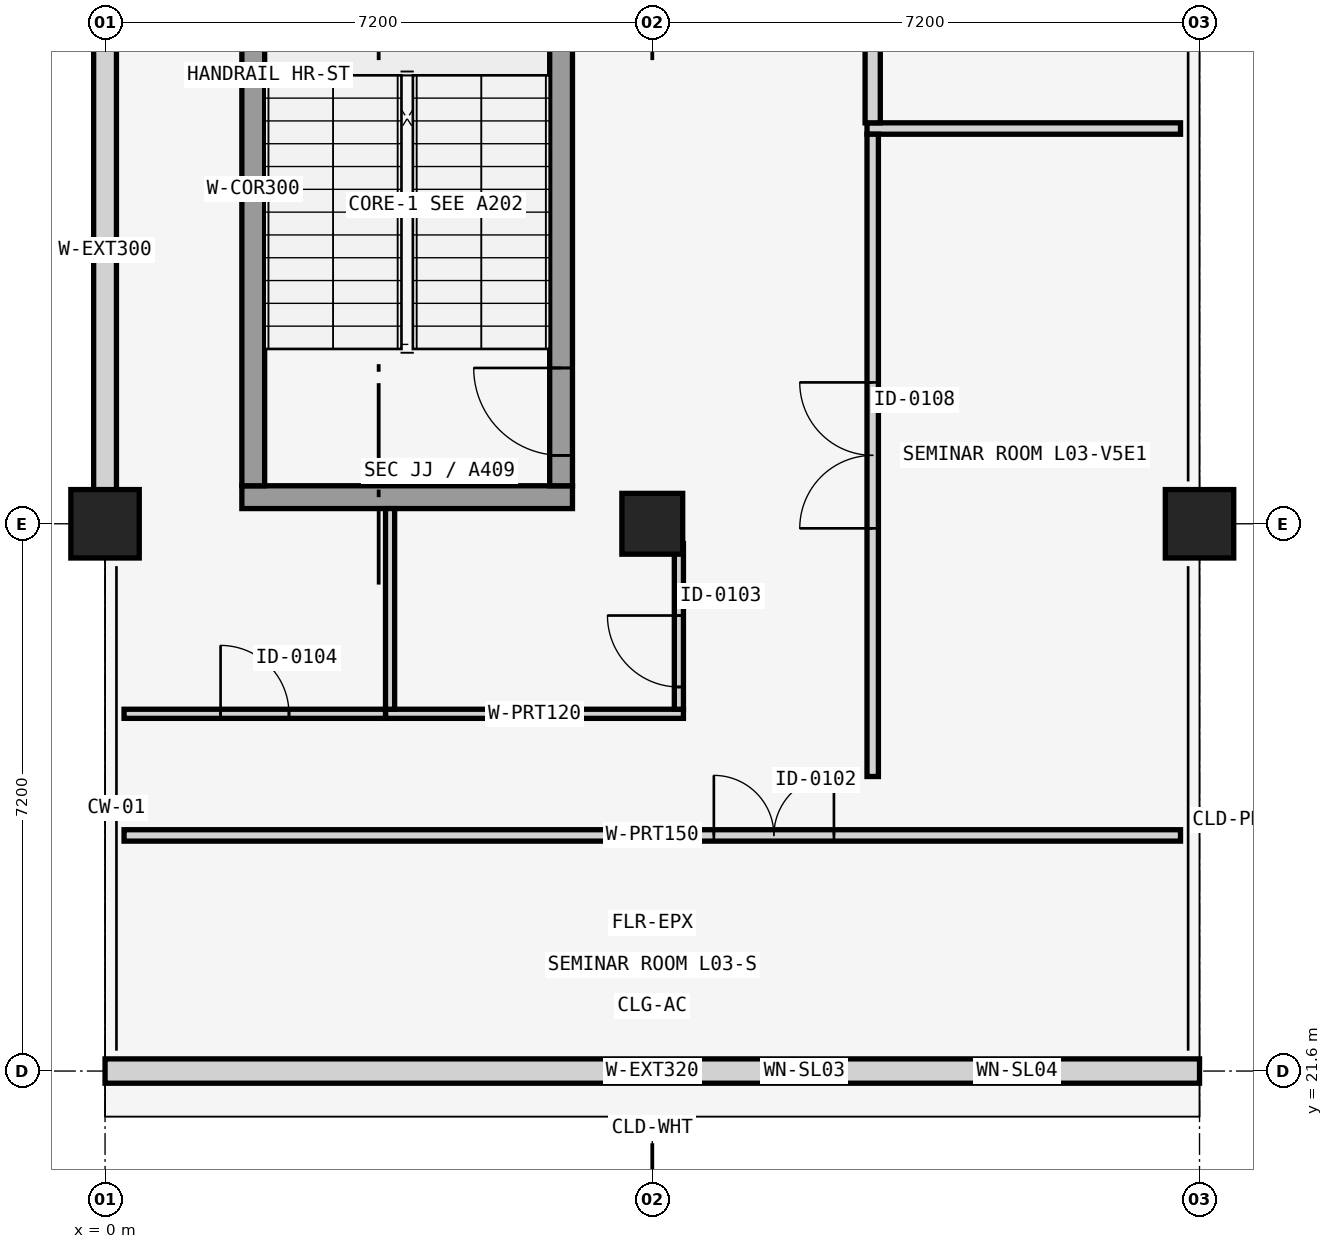
"""IFC4 building model, lengths in metres.
Left out: names, types, materials, properties, quantities, classifications, styles, units other than length and angle.
Written with IfcOpenShell. Run it as: python <this file> out.ifc"""

import sys

from ifc_helpers import new_model, si_unit, direction, frame, frame_2d, origin, origin_2d, place, context, subcontext, project, spatial, rectangle, extrude, element, fill, save


model = new_model("IFC4")
c1 = context("Model", 3, precision=1e-05, world=origin(), true_north=direction((0.0, 1.0)))
c2 = subcontext(c1, "Body", "Model", "MODEL_VIEW")
j1 = project(units=[si_unit("LENGTHUNIT", "METRE"), si_unit("PLANEANGLEUNIT", "RADIAN")], contexts=[c1])
p1 = place(None, origin())
s1 = spatial("IfcSite", under=j1, at=p1, CompositionType="ELEMENT")
p2 = place(p1, origin())
s2 = spatial("IfcBuilding", under=s1, at=p2, CompositionType="ELEMENT")
p3 = place(p2, frame((0.0, 0.0, 13.12)))
s3 = spatial("IfcBuildingStorey", under=s2, at=p3, CompositionType="ELEMENT", Elevation=13.12)
p4 = place(p3, frame((0.0, 28.8, 0.0), z_axis=(0.0, 0.0, 1.0), x_axis=(1.0, 0.0, 0.0)))
e1 = element("IfcColumn", 1, at=p4, inside=s3, PredefinedType="COLUMN", context=c2, shape_type="SweptSolid", body=[
    extrude(rectangle(XDim=0.9, YDim=0.9, at=origin_2d()), origin(), (0.0, 0.0, 1.0), 4.16),
])
p5 = place(p3, frame((7.2, 28.8, 0.0), z_axis=(0.0, 0.0, 1.0), x_axis=(1.0, 0.0, 0.0)))
e2 = element("IfcColumn", 2, at=p5, inside=s3, PredefinedType="COLUMN", context=c2, shape_type="SweptSolid", body=[
    extrude(rectangle(XDim=0.8, YDim=0.8, at=origin_2d()), origin(), (0.0, 0.0, 1.0), 4.16),
])
p6 = place(p3, frame((14.4, 28.8, 0.0), z_axis=(0.0, 0.0, 1.0), x_axis=(1.0, 0.0, 0.0)))
e3 = element("IfcColumn", 3, at=p6, inside=s3, PredefinedType="COLUMN", context=c2, shape_type="SweptSolid", body=[
    extrude(rectangle(XDim=0.9, YDim=0.9, at=origin_2d()), origin(), (0.0, 0.0, 1.0), 4.16),
])
p7 = place(p3, frame((0.0, 21.6, 0.0), z_axis=(0.0, 0.0, 1.0), x_axis=(1.0, 0.0, 0.0)))
e4 = element("IfcWall", 4, at=p7, inside=s3, PredefinedType="SOLIDWALL", context=c2, shape_type="SweptSolid", body=[
    extrude(rectangle(XDim=14.4, YDim=0.32, at=frame_2d((7.2, 0.0))), origin(), (0.0, 0.0, 1.0), 2.81),
])
p8 = place(p7, frame((8.925, 0.0, 0.45)))
e5 = element("IfcOpeningElement", 5, at=p8, cuts=e4, PredefinedType="OPENING", context=c2, shape_type="SweptSolid", body=[
    extrude(rectangle(XDim=0.55, YDim=2.2, at=frame_2d((0.275, 1.1))), frame((0.0, 0.17, 0.0), z_axis=(0.0, -1.0, 0.0), x_axis=(1.0, 0.0, 0.0)), (0.0, 0.0, 1.0), 0.34),
])
p9 = place(p7, frame((11.775, 0.0, 0.55)))
e6 = element("IfcOpeningElement", 6, at=p9, cuts=e4, PredefinedType="OPENING", context=c2, shape_type="SweptSolid", body=[
    extrude(rectangle(XDim=0.45, YDim=2.1, at=frame_2d((0.225, 1.05))), frame((0.0, 0.17, 0.0), z_axis=(0.0, -1.0, 0.0), x_axis=(1.0, 0.0, 0.0)), (0.0, 0.0, 1.0), 0.34),
])
p10 = place(p3, frame((0.0, 29.24, 0.0), z_axis=(0.0, 0.0, 1.0), x_axis=(0.0, 1.0, 0.0)))
e7 = element("IfcWall", 7, at=p10, inside=s3, PredefinedType="SOLIDWALL", context=c2, shape_type="SweptSolid", body=[
    extrude(rectangle(XDim=6.32, YDim=0.3, at=frame_2d((3.16, 0.0))), origin(), (0.0, 0.0, 1.0), 2.81),
])
p11 = place(p3, frame((1.8, 29.15, 0.0), z_axis=(0.0, 0.0, 1.0), x_axis=(1.0, 0.0, 0.0)))
e8 = element("IfcWall", 8, at=p11, inside=s3, PredefinedType="SHEAR", context=c2, shape_type="SweptSolid", body=[
    extrude(rectangle(XDim=4.35, YDim=0.3, at=frame_2d((2.175, 0.0))), origin(), (0.0, 0.0, 1.0), 3.81),
])
p12 = place(p3, frame((1.95, 29.3, 0.0), z_axis=(0.0, 0.0, 1.0), x_axis=(0.0, 1.0, 0.0)))
e9 = element("IfcWall", 9, at=p12, inside=s3, PredefinedType="SHEAR", context=c2, shape_type="SweptSolid", body=[
    extrude(rectangle(XDim=7.8, YDim=0.3, at=frame_2d((3.9, 0.0))), origin(), (0.0, 0.0, 1.0), 3.81),
])
p13 = place(p3, frame((6.0, 29.3, 0.0), z_axis=(0.0, 0.0, 1.0), x_axis=(0.0, 1.0, 0.0)))
e10 = element("IfcWall", 10, at=p13, inside=s3, PredefinedType="SHEAR", context=c2, shape_type="SweptSolid", body=[
    extrude(rectangle(XDim=7.8, YDim=0.3, at=frame_2d((3.9, 0.0))), origin(), (0.0, 0.0, 1.0), 3.81),
])
p14 = place(p13, frame((0.4, 0.0, 0.0)))
e11 = element("IfcOpeningElement", 11, at=p14, cuts=e10, PredefinedType="OPENING", context=c2, shape_type="SweptSolid", body=[
    extrude(rectangle(XDim=1.15, YDim=2.2, at=frame_2d((0.575, 1.1))), frame((0.0, 0.16, 0.0), z_axis=(0.0, -1.0, 0.0), x_axis=(1.0, 0.0, 0.0)), (0.0, 0.0, 1.0), 0.32),
])
p15 = place(p3, frame((0.25, 24.7, 0.0), z_axis=(0.0, 0.0, 1.0), x_axis=(1.0, 0.0, 0.0)))
e12 = element("IfcWall", 12, at=p15, inside=s3, PredefinedType="PARTITIONING", context=c2, shape_type="SweptSolid", body=[
    extrude(rectangle(XDim=13.9, YDim=0.15, at=frame_2d((6.95, 0.0))), origin(), (0.0, 0.0, 1.0), 2.81),
])
p16 = place(p15, frame((7.76, 0.0, 0.0)))
e13 = element("IfcOpeningElement", 13, at=p16, cuts=e12, PredefinedType="OPENING", context=c2, shape_type="SweptSolid", body=[
    extrude(rectangle(XDim=1.58, YDim=2.22, at=frame_2d((0.79, 1.11))), frame((0.0, 0.085, 0.0), z_axis=(0.0, -1.0, 0.0), x_axis=(1.0, 0.0, 0.0)), (0.0, 0.0, 1.0), 0.17),
])
p17 = place(p3, frame((3.69, 26.3, 0.0), z_axis=(0.0, 0.0, 1.0), x_axis=(1.0, 0.0, 0.0)))
e14 = element("IfcWall", 14, at=p17, inside=s3, PredefinedType="PARTITIONING", context=c2, shape_type="SweptSolid", body=[
    extrude(rectangle(XDim=3.92, YDim=0.12, at=frame_2d((1.96, 0.0))), origin(), (0.0, 0.0, 1.0), 2.81),
])
p18 = place(p3, frame((3.75, 26.36, 0.0), z_axis=(0.0, 0.0, 1.0), x_axis=(0.0, 1.0, 0.0)))
e15 = element("IfcWall", 15, at=p18, inside=s3, PredefinedType="PARTITIONING", context=c2, shape_type="SweptSolid", body=[
    extrude(rectangle(XDim=2.64, YDim=0.12, at=frame_2d((1.32, 0.0))), origin(), (0.0, 0.0, 1.0), 3.21),
])
p19 = place(p3, frame((7.55, 26.36, 0.0), z_axis=(0.0, 0.0, 1.0), x_axis=(0.0, 1.0, 0.0)))
e16 = element("IfcWall", 16, at=p19, inside=s3, PredefinedType="PARTITIONING", context=c2, shape_type="SweptSolid", body=[
    extrude(rectangle(XDim=2.18, YDim=0.12, at=frame_2d((1.09, 0.0))), origin(), (0.0, 0.0, 1.0), 3.81),
])
p20 = place(p19, frame((0.293, 0.0, 0.0)))
e17 = element("IfcOpeningElement", 17, at=p20, cuts=e16, PredefinedType="OPENING", context=c2, shape_type="SweptSolid", body=[
    extrude(rectangle(XDim=0.94, YDim=2.1, at=frame_2d((0.47, 1.05))), frame((0.0, 0.07, 0.0), z_axis=(0.0, -1.0, 0.0), x_axis=(1.0, 0.0, 0.0)), (0.0, 0.0, 1.0), 0.14),
])
p21 = place(p3, frame((0.25, 26.3, 0.0), z_axis=(0.0, 0.0, 1.0), x_axis=(1.0, 0.0, 0.0)))
e18 = element("IfcWall", 18, at=p21, inside=s3, PredefinedType="PARTITIONING", context=c2, shape_type="SweptSolid", body=[
    extrude(rectangle(XDim=3.44, YDim=0.12, at=frame_2d((1.72, 0.0))), origin(), (0.0, 0.0, 1.0), 3.81),
])
p22 = place(p21, frame((1.27, 0.0, 0.0)))
e19 = element("IfcOpeningElement", 19, at=p22, cuts=e18, PredefinedType="OPENING", context=c2, shape_type="SweptSolid", body=[
    extrude(rectangle(XDim=0.9, YDim=2.1, at=frame_2d((0.45, 1.05))), frame((0.0, 0.07, 0.0), z_axis=(0.0, -1.0, 0.0), x_axis=(1.0, 0.0, 0.0)), (0.0, 0.0, 1.0), 0.14),
])
p23 = place(p3, frame((10.025, 34.0, 0.0), z_axis=(0.0, 0.0, 1.0), x_axis=(1.0, 0.0, 0.0)))
e20 = element("IfcWall", 20, at=p23, inside=s3, PredefinedType="PARTITIONING", context=c2, shape_type="SweptSolid", body=[
    extrude(rectangle(XDim=4.125, YDim=0.15, at=frame_2d((2.062, 0.0))), origin(), (0.0, 0.0, 1.0), 3.81),
])
p24 = place(p3, frame((10.1, 25.475, 0.0), z_axis=(0.0, 0.0, 1.0), x_axis=(0.0, 1.0, 0.0)))
e21 = element("IfcWall", 21, at=p24, inside=s3, PredefinedType="PARTITIONING", context=c2, shape_type="SweptSolid", body=[
    extrude(rectangle(XDim=8.45, YDim=0.15, at=frame_2d((4.225, 0.0))), origin(), (0.0, 0.0, 1.0), 3.21),
])
p25 = place(p24, frame((3.265, 0.0, 0.0)))
e22 = element("IfcOpeningElement", 22, at=p25, cuts=e21, PredefinedType="OPENING", context=c2, shape_type="SweptSolid", body=[
    extrude(rectangle(XDim=1.92, YDim=2.28, at=frame_2d((0.96, 1.14))), frame((0.0, 0.085, 0.0), z_axis=(0.0, -1.0, 0.0), x_axis=(1.0, 0.0, 0.0)), (0.0, 0.0, 1.0), 0.17),
])
p26 = place(p3, frame((10.1, 34.075, 0.0), z_axis=(0.0, 0.0, 1.0), x_axis=(0.0, 1.0, 0.0)))
e23 = element("IfcWall", 23, at=p26, inside=s3, PredefinedType="PARTITIONING", context=c2, shape_type="SweptSolid", body=[
    extrude(rectangle(XDim=16.025, YDim=0.2, at=frame_2d((8.013, 0.0))), origin(), (0.0, 0.0, 1.0), 3.21),
])
p27 = place(p26, frame((7.488, 0.0, 0.0)))
e24 = element("IfcOpeningElement", 24, at=p27, cuts=e23, PredefinedType="OPENING", context=c2, shape_type="SweptSolid", body=[
    extrude(rectangle(XDim=1.05, YDim=2.15, at=frame_2d((0.525, 1.075))), frame((0.0, 0.11, 0.0), z_axis=(0.0, -1.0, 0.0), x_axis=(1.0, 0.0, 0.0)), (0.0, 0.0, 1.0), 0.22),
])
p28 = place(p8, origin())
e25 = element("IfcWindow", 25, at=p28, inside=s3, PartitioningType="SINGLE_PANEL", PredefinedType="WINDOW", context=c2, shape_type="SweptSolid", body=[
    extrude(rectangle(XDim=0.55, YDim=2.2, at=frame_2d((0.275, 1.1))), frame((0.0, 0.03, 0.0), z_axis=(0.0, -1.0, 0.0), x_axis=(1.0, 0.0, 0.0)), (0.0, 0.0, 1.0), 0.06),
])
fill(e5, e25)
p29 = place(p9, origin())
e26 = element("IfcWindow", 26, at=p29, inside=s3, PartitioningType="SINGLE_PANEL", PredefinedType="WINDOW", context=c2, shape_type="SweptSolid", body=[
    extrude(rectangle(XDim=0.45, YDim=2.1, at=frame_2d((0.225, 1.05))), frame((0.0, 0.03, 0.0), z_axis=(0.0, -1.0, 0.0), x_axis=(1.0, 0.0, 0.0)), (0.0, 0.0, 1.0), 0.06),
])
fill(e6, e26)
p30 = place(p14, origin())
e27 = element("IfcDoor", 27, at=p30, inside=s3, OperationType="SINGLE_SWING_RIGHT", PredefinedType="DOOR", context=c2, shape_type="SweptSolid", body=[
    extrude(rectangle(XDim=1.15, YDim=2.2, at=frame_2d((0.575, 1.1))), frame((0.0, 0.025, 0.0), z_axis=(0.0, -1.0, 0.0), x_axis=(1.0, 0.0, 0.0)), (0.0, 0.0, 1.0), 0.05),
])
fill(e11, e27)
p31 = place(p16, origin())
e28 = element("IfcDoor", 28, at=p31, inside=s3, OperationType="DOUBLE_DOOR_SINGLE_SWING", PredefinedType="DOOR", context=c2, shape_type="SweptSolid", body=[
    extrude(rectangle(XDim=1.58, YDim=2.22, at=frame_2d((0.79, 1.11))), frame((0.0, 0.025, 0.0), z_axis=(0.0, -1.0, 0.0), x_axis=(1.0, 0.0, 0.0)), (0.0, 0.0, 1.0), 0.05),
])
fill(e13, e28)
p32 = place(p20, frame((0.94, 0.0, 0.0), z_axis=(0.0, 0.0, 1.0), x_axis=(-1.0, 0.0, 0.0)))
e29 = element("IfcDoor", 29, at=p32, inside=s3, OperationType="SINGLE_SWING_RIGHT", PredefinedType="DOOR", context=c2, shape_type="SweptSolid", body=[
    extrude(rectangle(XDim=0.94, YDim=2.1, at=frame_2d((0.47, 1.05))), frame((0.0, 0.025, 0.0), z_axis=(0.0, -1.0, 0.0), x_axis=(1.0, 0.0, 0.0)), (0.0, 0.0, 1.0), 0.05),
])
fill(e17, e29)
p33 = place(p22, origin())
e30 = element("IfcDoor", 30, at=p33, inside=s3, OperationType="SINGLE_SWING_LEFT", PredefinedType="DOOR", context=c2, shape_type="SweptSolid", body=[
    extrude(rectangle(XDim=0.9, YDim=2.1, at=frame_2d((0.45, 1.05))), frame((0.0, 0.025, 0.0), z_axis=(0.0, -1.0, 0.0), x_axis=(1.0, 0.0, 0.0)), (0.0, 0.0, 1.0), 0.05),
])
fill(e19, e30)
p34 = place(p25, origin())
e31 = element("IfcDoor", 31, at=p34, inside=s3, OperationType="DOUBLE_DOOR_SINGLE_SWING", PredefinedType="DOOR", context=c2, shape_type="SweptSolid", body=[
    extrude(rectangle(XDim=1.92, YDim=2.28, at=frame_2d((0.96, 1.14))), frame((0.0, 0.025, 0.0), z_axis=(0.0, -1.0, 0.0), x_axis=(1.0, 0.0, 0.0)), (0.0, 0.0, 1.0), 0.05),
])
fill(e22, e31)
save(model, sys.argv[1])
